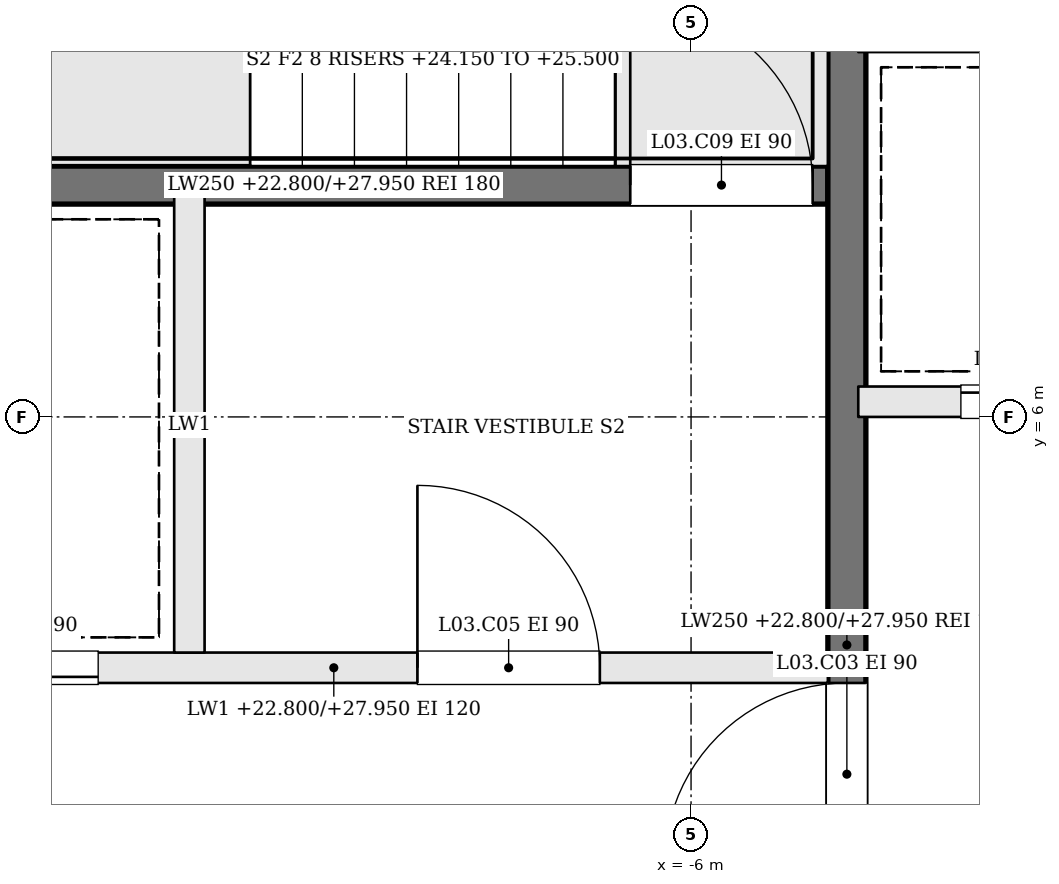
"""IFC4 building model, lengths in metres.
Left out: names, types, materials, properties, quantities, classifications, styles, units other than length and angle.
Written with IfcOpenShell. Run it as: python <this file> out.ifc"""

import sys

from ifc_helpers import new_model, si_unit, direction, frame, frame_2d, origin, place, context, subcontext, project, spatial, rectangle, extrude, element, fill, save


model = new_model("IFC4")
c1 = context("Model", 3, precision=1e-05, world=origin(), true_north=direction((0.0, 1.0)))
c2 = subcontext(c1, "Body", "Model", "MODEL_VIEW")
j1 = project(units=[si_unit("LENGTHUNIT", "METRE"), si_unit("PLANEANGLEUNIT", "RADIAN")], contexts=[c1])
p1 = place(None, origin())
s1 = spatial("IfcSite", under=j1, at=p1, CompositionType="ELEMENT")
p2 = place(p1, origin())
s2 = spatial("IfcBuilding", under=s1, at=p2, CompositionType="ELEMENT")
p3 = place(p2, frame((0.0, 0.0, 22.8)))
s3 = spatial("IfcBuildingStorey", under=s2, at=p3, CompositionType="ELEMENT", Elevation=22.8)
p4 = place(p3, frame((-11.6, 4.35, 0.0), z_axis=(0.0, 0.0, 1.0), x_axis=(1.0, 0.0, 0.0)))
e1 = element("IfcWall", 1, at=p4, inside=s3, PredefinedType="SOLIDWALL", context=c2, shape_type="SweptSolid", body=[
    extrude(rectangle(XDim=6.5, YDim=0.2, at=frame_2d((3.25, 0.0))), origin(), (0.0, 0.0, 1.0), 5.15),
])
p5 = place(p4, frame((3.8, 0.0, 0.0)))
e2 = element("IfcOpeningElement", 2, at=p5, cuts=e1, PredefinedType="OPENING", context=c2, shape_type="SweptSolid", body=[
    extrude(rectangle(XDim=1.2, YDim=2.1, at=frame_2d((0.6, 1.05))), frame((0.0, 0.11, 0.0), z_axis=(0.0, -1.0, 0.0), x_axis=(1.0, 0.0, 0.0)), (0.0, 0.0, 1.0), 0.22),
])
p6 = place(p4, frame((0.5, 0.0, 0.0)))
e3 = element("IfcOpeningElement", 3, at=p6, cuts=e1, PredefinedType="OPENING", context=c2, shape_type="SweptSolid", body=[
    extrude(rectangle(XDim=1.2, YDim=2.1, at=frame_2d((0.6, 1.05))), frame((0.0, 0.11, 0.0), z_axis=(0.0, -1.0, 0.0), x_axis=(1.0, 0.0, 0.0)), (0.0, 0.0, 1.0), 0.22),
])
p7 = place(p3, frame((-11.6, 7.525, 0.0), z_axis=(0.0, 0.0, 1.0), x_axis=(1.0, 0.0, 0.0)))
e4 = element("IfcWall", 4, at=p7, inside=s3, PredefinedType="SOLIDWALL", context=c2, shape_type="SweptSolid", body=[
    extrude(rectangle(XDim=6.5, YDim=0.25, at=frame_2d((3.25, 0.0))), origin(), (0.0, 0.0, 1.0), 5.15),
])
p8 = place(p7, frame((5.2, 0.0, 0.0)))
e5 = element("IfcOpeningElement", 5, at=p8, cuts=e4, PredefinedType="OPENING", context=c2, shape_type="SweptSolid", body=[
    extrude(rectangle(XDim=1.2, YDim=2.1, at=frame_2d((0.6, 1.05))), frame((0.0, 0.135, 0.0), z_axis=(0.0, -1.0, 0.0), x_axis=(1.0, 0.0, 0.0)), (0.0, 0.0, 1.0), 0.27),
])
p9 = place(p3, frame((-9.3, 4.45, 0.0), z_axis=(0.0, 0.0, 1.0), x_axis=(0.0, 1.0, 0.0)))
e6 = element("IfcWall", 6, at=p9, inside=s3, PredefinedType="SOLIDWALL", context=c2, shape_type="SweptSolid", body=[
    extrude(rectangle(XDim=3.0, YDim=0.2, at=frame_2d((1.5, 0.0))), origin(), (0.0, 0.0, 1.0), 5.15),
])
p10 = place(p3, frame((-4.975, -1.6, 0.0), z_axis=(0.0, 0.0, 1.0), x_axis=(0.0, 1.0, 0.0)))
e7 = element("IfcWall", 7, at=p10, inside=s3, PredefinedType="SOLIDWALL", context=c2, shape_type="SweptSolid", body=[
    extrude(rectangle(XDim=12.2, YDim=0.25, at=frame_2d((6.1, 0.0))), origin(), (0.0, 0.0, 1.0), 5.15),
])
p11 = place(p10, frame((4.65, 0.0, 0.0)))
e8 = element("IfcOpeningElement", 8, at=p11, cuts=e7, PredefinedType="OPENING", context=c2, shape_type="SweptSolid", body=[
    extrude(rectangle(XDim=1.2, YDim=2.1, at=frame_2d((0.6, 1.05))), frame((0.0, 0.135, 0.0), z_axis=(0.0, -1.0, 0.0), x_axis=(1.0, 0.0, 0.0)), (0.0, 0.0, 1.0), 0.27),
])
p12 = place(p3, frame((-4.9, 6.1, 0.0), z_axis=(0.0, 0.0, 1.0), x_axis=(1.0, 0.0, 0.0)))
e9 = element("IfcWall", 9, at=p12, inside=s3, PredefinedType="SOLIDWALL", context=c2, shape_type="SweptSolid", body=[
    extrude(rectangle(XDim=9.8, YDim=0.2, at=frame_2d((4.9, 0.0))), origin(), (0.0, 0.0, 1.0), 5.15),
])
p13 = place(p12, frame((0.675, 0.0, 0.0)))
e10 = element("IfcOpeningElement", 10, at=p13, cuts=e9, PredefinedType="OPENING", context=c2, shape_type="SweptSolid", body=[
    extrude(rectangle(XDim=1.1, YDim=2.1, at=frame_2d((0.55, 1.05))), frame((0.0, 0.11, 0.0), z_axis=(0.0, -1.0, 0.0), x_axis=(1.0, 0.0, 0.0)), (0.0, 0.0, 1.0), 0.22),
])
p14 = place(p12, frame((3.125, 0.0, 0.0)))
e11 = element("IfcOpeningElement", 11, at=p14, cuts=e9, PredefinedType="OPENING", context=c2, shape_type="SweptSolid", body=[
    extrude(rectangle(XDim=1.1, YDim=2.1, at=frame_2d((0.55, 1.05))), frame((0.0, 0.11, 0.0), z_axis=(0.0, -1.0, 0.0), x_axis=(1.0, 0.0, 0.0)), (0.0, 0.0, 1.0), 0.22),
])
p15 = place(p12, frame((5.575, 0.0, 0.0)))
e12 = element("IfcOpeningElement", 12, at=p15, cuts=e9, PredefinedType="OPENING", context=c2, shape_type="SweptSolid", body=[
    extrude(rectangle(XDim=1.1, YDim=2.1, at=frame_2d((0.55, 1.05))), frame((0.0, 0.11, 0.0), z_axis=(0.0, -1.0, 0.0), x_axis=(1.0, 0.0, 0.0)), (0.0, 0.0, 1.0), 0.22),
])
p16 = place(p12, frame((8.025, 0.0, 0.0)))
e13 = element("IfcOpeningElement", 13, at=p16, cuts=e9, PredefinedType="OPENING", context=c2, shape_type="SweptSolid", body=[
    extrude(rectangle(XDim=1.1, YDim=2.1, at=frame_2d((0.55, 1.05))), frame((0.0, 0.11, 0.0), z_axis=(0.0, -1.0, 0.0), x_axis=(1.0, 0.0, 0.0)), (0.0, 0.0, 1.0), 0.22),
])
p17 = place(p11, origin())
e14 = element("IfcDoor", 14, at=p17, inside=s3, OperationType="SINGLE_SWING_LEFT", PredefinedType="DOOR", context=c2, shape_type="SweptSolid", body=[
    extrude(rectangle(XDim=1.2, YDim=2.1, at=frame_2d((0.6, 1.05))), frame((0.0, 0.025, 0.0), z_axis=(0.0, -1.0, 0.0), x_axis=(1.0, 0.0, 0.0)), (0.0, 0.0, 1.0), 0.05),
])
fill(e8, e14)
p18 = place(p5, origin())
e15 = element("IfcDoor", 15, at=p18, inside=s3, OperationType="SINGLE_SWING_LEFT", PredefinedType="DOOR", context=c2, shape_type="SweptSolid", body=[
    extrude(rectangle(XDim=1.2, YDim=2.1, at=frame_2d((0.6, 1.05))), frame((0.0, 0.025, 0.0), z_axis=(0.0, -1.0, 0.0), x_axis=(1.0, 0.0, 0.0)), (0.0, 0.0, 1.0), 0.05),
])
fill(e2, e15)
p19 = place(p8, origin())
e16 = element("IfcDoor", 16, at=p19, inside=s3, OperationType="SINGLE_SWING_LEFT", PredefinedType="DOOR", context=c2, shape_type="SweptSolid", body=[
    extrude(rectangle(XDim=1.2, YDim=2.1, at=frame_2d((0.6, 1.05))), frame((0.0, 0.025, 0.0), z_axis=(0.0, -1.0, 0.0), x_axis=(1.0, 0.0, 0.0)), (0.0, 0.0, 1.0), 0.05),
])
fill(e5, e16)
p20 = place(p6, origin())
e17 = element("IfcDoor", 17, at=p20, inside=s3, OperationType="SLIDING_TO_RIGHT", PredefinedType="DOOR", context=c2, shape_type="SweptSolid", body=[
    extrude(rectangle(XDim=1.2, YDim=2.1, at=frame_2d((0.6, 1.05))), frame((0.0, 0.025, 0.0), z_axis=(0.0, -1.0, 0.0), x_axis=(1.0, 0.0, 0.0)), (0.0, 0.0, 1.0), 0.05),
])
fill(e3, e17)
p21 = place(p13, origin())
e18 = element("IfcDoor", 18, at=p21, inside=s3, OperationType="SLIDING_TO_RIGHT", PredefinedType="DOOR", context=c2, shape_type="SweptSolid", body=[
    extrude(rectangle(XDim=1.1, YDim=2.1, at=frame_2d((0.55, 1.05))), frame((0.0, 0.025, 0.0), z_axis=(0.0, -1.0, 0.0), x_axis=(1.0, 0.0, 0.0)), (0.0, 0.0, 1.0), 0.05),
])
fill(e10, e18)
save(model, sys.argv[1])
